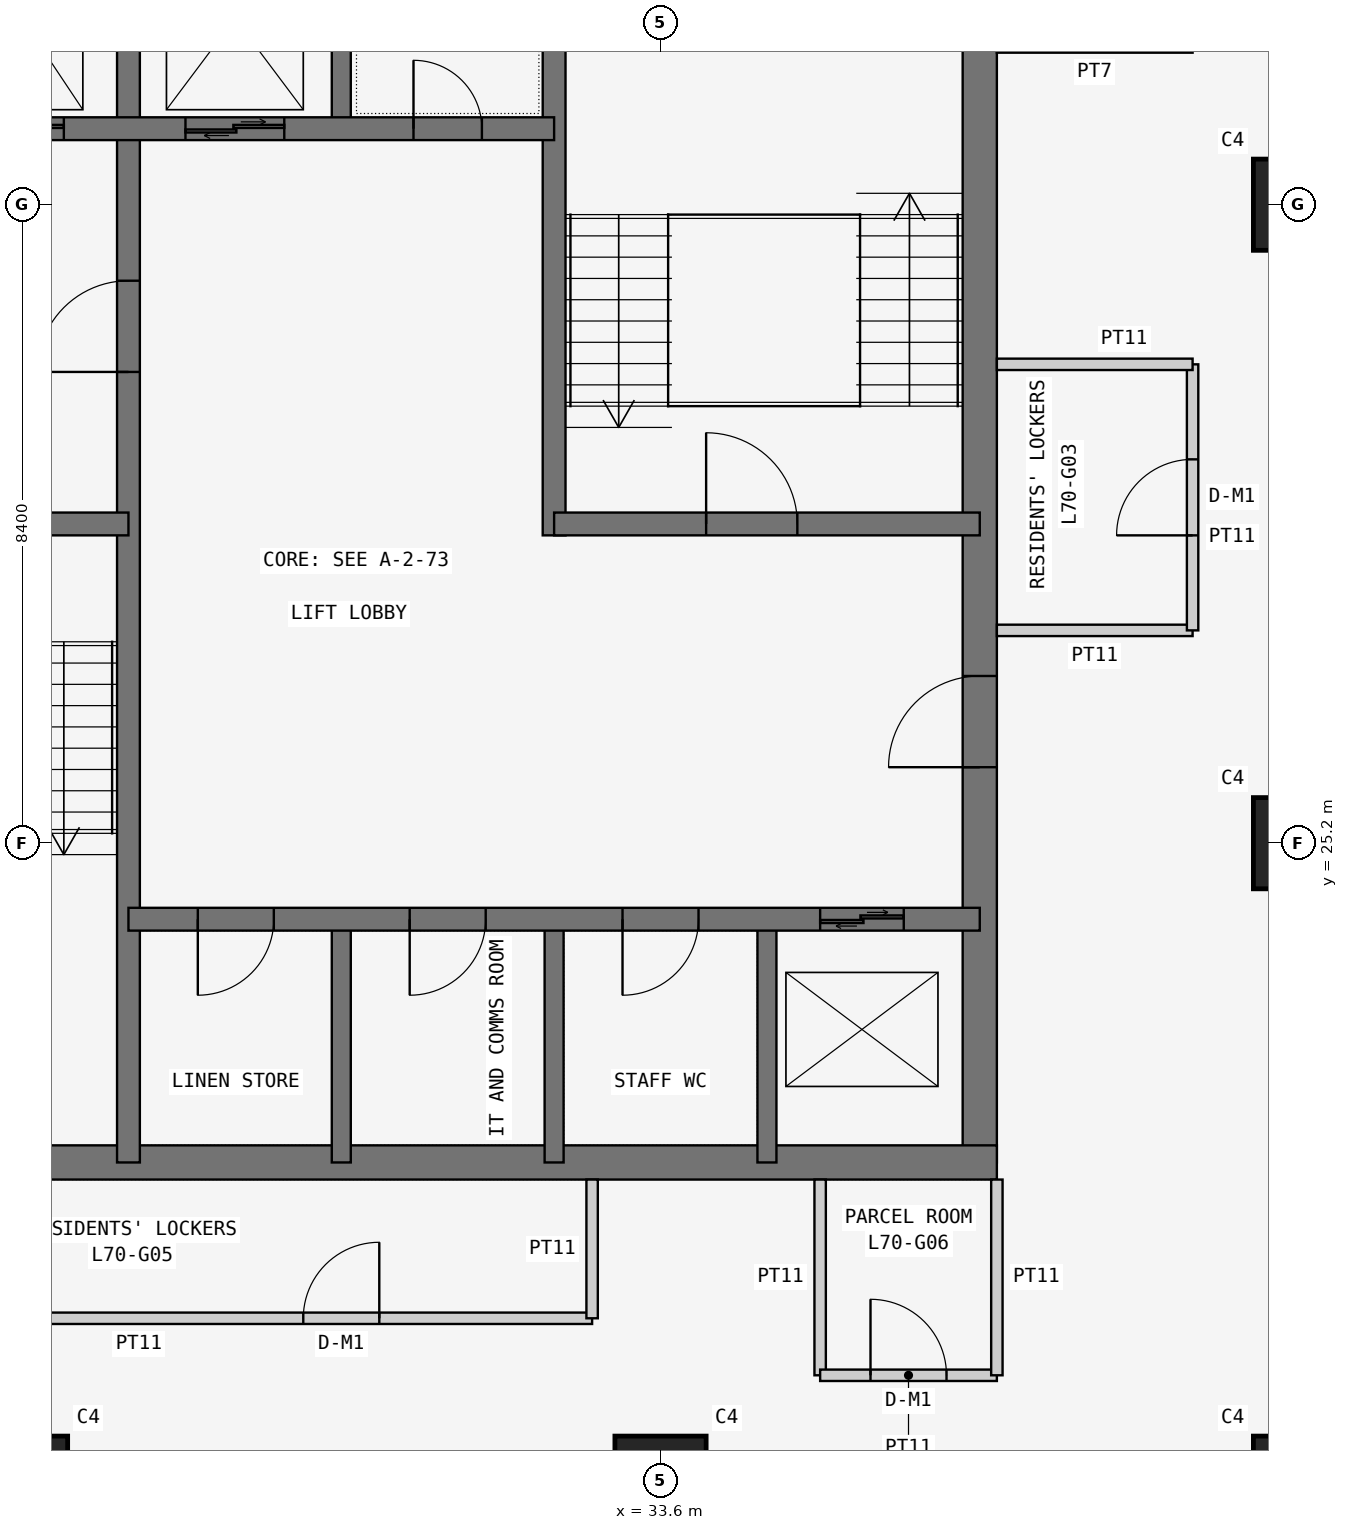
"""IFC4 building model, lengths in metres.
Left out: names, types, materials, properties, quantities, classifications, styles, units other than length and angle.
Written with IfcOpenShell. Run it as: python <this file> out.ifc"""

import sys

from ifc_helpers import new_model, si_unit, direction, frame, frame_2d, origin, origin_2d, place, context, subcontext, project, spatial, rectangle, extrude, element, fill, save


model = new_model("IFC4")
c1 = context("Model", 3, precision=1e-05, world=origin(), true_north=direction((0.0, 1.0)))
c2 = subcontext(c1, "Body", "Model", "MODEL_VIEW")
j1 = project(units=[si_unit("LENGTHUNIT", "METRE"), si_unit("PLANEANGLEUNIT", "RADIAN")], contexts=[c1])
p1 = place(None, origin())
s1 = spatial("IfcSite", under=j1, at=p1, CompositionType="ELEMENT")
p2 = place(p1, origin())
s2 = spatial("IfcBuilding", under=s1, at=p2, CompositionType="ELEMENT")
p3 = place(p2, frame((0.0, 0.0, 268.5)))
s3 = spatial("IfcBuildingStorey", under=s2, at=p3, CompositionType="ELEMENT", Elevation=268.5)
for number, where, z_axis, x_axis in (
    (1, (25.2, 16.8, 0.0), (0.0, 0.0, 1.0), (1.0, 0.0, 0.0)),
    (2, (33.6, 16.8, 0.0), (0.0, 0.0, 1.0), (1.0, 0.0, 0.0)),
    (3, (42.0, 16.8, 0.0), (0.0, 0.0, 1.0), (1.0, 0.0, 0.0)),
    (4, (42.0, 25.2, 0.0), (0.0, 0.0, 1.0), (1.0, 0.0, 0.0)),
    (5, (42.0, 33.6, 0.0), (0.0, 0.0, 1.0), (1.0, 0.0, 0.0)),
):
    element("IfcColumn", number, at=place(p3, frame(where, z_axis=z_axis, x_axis=x_axis)), inside=s3, PredefinedType="COLUMN", context=c2, shape_type="SweptSolid", body=[
        extrude(rectangle(XDim=1.2, YDim=1.2, at=origin_2d()), origin(), (0.0, 0.0, 1.0), 3.6),
    ])
p4 = place(p3, frame((21.0, 21.0, 0.0), z_axis=(0.0, 0.0, 1.0), x_axis=(1.0, 0.0, 0.0)))
e6 = element("IfcWall", 6, at=p4, inside=s3, PredefinedType="SHEAR", context=c2, shape_type="SweptSolid", body=[
    extrude(rectangle(XDim=17.025, YDim=0.45, at=frame_2d((8.512, 0.0))), origin(), (0.0, 0.0, 1.0), 3.6),
])
p5 = place(p3, frame((37.8, 21.0, 0.0), z_axis=(0.0, 0.0, 1.0), x_axis=(0.0, 1.0, 0.0)))
e7 = element("IfcWall", 7, at=p5, inside=s3, PredefinedType="SHEAR", context=c2, shape_type="SweptSolid", body=[
    extrude(rectangle(XDim=17.025, YDim=0.45, at=frame_2d((8.512, 0.0))), origin(), (0.0, 0.0, 1.0), 3.6),
])
p6 = place(p5, frame((5.2, 0.0, 0.0)))
e8 = element("IfcOpeningElement", 8, at=p6, cuts=e7, PredefinedType="OPENING", context=c2, shape_type="SweptSolid", body=[
    extrude(rectangle(XDim=1.2, YDim=2.1, at=frame_2d((0.6, 1.05))), frame((0.0, 0.235, 0.0), z_axis=(0.0, -1.0, 0.0), x_axis=(1.0, 0.0, 0.0)), (0.0, 0.0, 1.0), 0.47),
])
p7 = place(p3, frame((26.6, 21.0, 0.0), z_axis=(0.0, 0.0, 1.0), x_axis=(0.0, 1.0, 0.0)))
e9 = element("IfcWall", 9, at=p7, inside=s3, PredefinedType="SHEAR", context=c2, shape_type="SweptSolid", body=[
    extrude(rectangle(XDim=16.8, YDim=0.3, at=frame_2d((8.4, 0.0))), origin(), (0.0, 0.0, 1.0), 3.6),
])
p8 = place(p7, frame((10.4, 0.0, 0.0)))
e10 = element("IfcOpeningElement", 10, at=p8, cuts=e9, PredefinedType="OPENING", context=c2, shape_type="SweptSolid", body=[
    extrude(rectangle(XDim=1.2, YDim=2.1, at=frame_2d((0.6, 1.05))), frame((0.0, 0.16, 0.0), z_axis=(0.0, -1.0, 0.0), x_axis=(1.0, 0.0, 0.0)), (0.0, 0.0, 1.0), 0.32),
])
p9 = place(p3, frame((21.0, 29.4, 0.0), z_axis=(0.0, 0.0, 1.0), x_axis=(1.0, 0.0, 0.0)))
e11 = element("IfcWall", 11, at=p9, inside=s3, PredefinedType="SHEAR", context=c2, shape_type="SweptSolid", body=[
    extrude(rectangle(XDim=5.6, YDim=0.3, at=frame_2d((2.8, 0.0))), origin(), (0.0, 0.0, 1.0), 3.6),
])
p10 = place(p9, frame((2.3, 0.0, 0.0)))
e12 = element("IfcOpeningElement", 12, at=p10, cuts=e11, PredefinedType="OPENING", context=c2, shape_type="SweptSolid", body=[
    extrude(rectangle(XDim=1.2, YDim=2.1, at=frame_2d((0.6, 1.05))), frame((0.0, 0.16, 0.0), z_axis=(0.0, -1.0, 0.0), x_axis=(1.0, 0.0, 0.0)), (0.0, 0.0, 1.0), 0.32),
])
p11 = place(p3, frame((21.0, 34.6, 0.0), z_axis=(0.0, 0.0, 1.0), x_axis=(1.0, 0.0, 0.0)))
e13 = element("IfcWall", 13, at=p11, inside=s3, PredefinedType="SHEAR", context=c2, shape_type="SweptSolid", body=[
    extrude(rectangle(XDim=11.2, YDim=0.3, at=frame_2d((5.6, 0.0))), origin(), (0.0, 0.0, 1.0), 3.6),
])
p12 = place(p11, frame((9.35, 0.0, 0.0)))
e14 = element("IfcOpeningElement", 14, at=p12, cuts=e13, PredefinedType="OPENING", context=c2, shape_type="SweptSolid", body=[
    extrude(rectangle(XDim=0.9, YDim=2.1, at=frame_2d((0.45, 1.05))), frame((0.0, 0.16, 0.0), z_axis=(0.0, -1.0, 0.0), x_axis=(1.0, 0.0, 0.0)), (0.0, 0.0, 1.0), 0.32),
])
p13 = place(p11, frame((1.0, 0.0, 0.0)))
e15 = element("IfcOpeningElement", 15, at=p13, cuts=e13, PredefinedType="OPENING", context=c2, shape_type="SweptSolid", body=[
    extrude(rectangle(XDim=1.1, YDim=2.1, at=frame_2d((0.55, 1.05))), frame((0.0, 0.16, 0.0), z_axis=(0.0, -1.0, 0.0), x_axis=(1.0, 0.0, 0.0)), (0.0, 0.0, 1.0), 0.32),
])
p14 = place(p11, frame((3.65, 0.0, 0.0)))
e16 = element("IfcOpeningElement", 16, at=p14, cuts=e13, PredefinedType="OPENING", context=c2, shape_type="SweptSolid", body=[
    extrude(rectangle(XDim=1.1, YDim=2.1, at=frame_2d((0.55, 1.05))), frame((0.0, 0.16, 0.0), z_axis=(0.0, -1.0, 0.0), x_axis=(1.0, 0.0, 0.0)), (0.0, 0.0, 1.0), 0.32),
])
p15 = place(p11, frame((6.35, 0.0, 0.0)))
e17 = element("IfcOpeningElement", 17, at=p15, cuts=e13, PredefinedType="OPENING", context=c2, shape_type="SweptSolid", body=[
    extrude(rectangle(XDim=1.3, YDim=2.1, at=frame_2d((0.65, 1.05))), frame((0.0, 0.16, 0.0), z_axis=(0.0, -1.0, 0.0), x_axis=(1.0, 0.0, 0.0)), (0.0, 0.0, 1.0), 0.32),
])
p16 = place(p3, frame((26.6, 24.2, 0.0), z_axis=(0.0, 0.0, 1.0), x_axis=(1.0, 0.0, 0.0)))
e18 = element("IfcWall", 18, at=p16, inside=s3, PredefinedType="SHEAR", context=c2, shape_type="SweptSolid", body=[
    extrude(rectangle(XDim=11.2, YDim=0.3, at=frame_2d((5.6, 0.0))), origin(), (0.0, 0.0, 1.0), 3.6),
])
p17 = place(p16, frame((0.913, 0.0, 0.0)))
e19 = element("IfcOpeningElement", 19, at=p17, cuts=e18, PredefinedType="OPENING", context=c2, shape_type="SweptSolid", body=[
    extrude(rectangle(XDim=1.0, YDim=2.1, at=frame_2d((0.5, 1.05))), frame((0.0, 0.16, 0.0), z_axis=(0.0, -1.0, 0.0), x_axis=(1.0, 0.0, 0.0)), (0.0, 0.0, 1.0), 0.32),
])
p18 = place(p16, frame((3.7, 0.0, 0.0)))
e20 = element("IfcOpeningElement", 20, at=p18, cuts=e18, PredefinedType="OPENING", context=c2, shape_type="SweptSolid", body=[
    extrude(rectangle(XDim=1.0, YDim=2.1, at=frame_2d((0.5, 1.05))), frame((0.0, 0.16, 0.0), z_axis=(0.0, -1.0, 0.0), x_axis=(1.0, 0.0, 0.0)), (0.0, 0.0, 1.0), 0.32),
])
p19 = place(p16, frame((6.5, 0.0, 0.0)))
e21 = element("IfcOpeningElement", 21, at=p19, cuts=e18, PredefinedType="OPENING", context=c2, shape_type="SweptSolid", body=[
    extrude(rectangle(XDim=1.0, YDim=2.1, at=frame_2d((0.5, 1.05))), frame((0.0, 0.16, 0.0), z_axis=(0.0, -1.0, 0.0), x_axis=(1.0, 0.0, 0.0)), (0.0, 0.0, 1.0), 0.32),
])
p20 = place(p16, frame((9.1, 0.0, 0.0)))
e22 = element("IfcOpeningElement", 22, at=p20, cuts=e18, PredefinedType="OPENING", context=c2, shape_type="SweptSolid", body=[
    extrude(rectangle(XDim=1.1, YDim=2.1, at=frame_2d((0.55, 1.05))), frame((0.0, 0.16, 0.0), z_axis=(0.0, -1.0, 0.0), x_axis=(1.0, 0.0, 0.0)), (0.0, 0.0, 1.0), 0.32),
])
p21 = place(p3, frame((32.2, 29.25, 0.0), z_axis=(0.0, 0.0, 1.0), x_axis=(0.0, 1.0, 0.0)))
e23 = element("IfcWall", 23, at=p21, inside=s3, PredefinedType="SHEAR", context=c2, shape_type="SweptSolid", body=[
    extrude(rectangle(XDim=8.55, YDim=0.3, at=frame_2d((4.275, 0.0))), origin(), (0.0, 0.0, 1.0), 3.6),
])
p22 = place(p3, frame((32.2, 29.4, 0.0), z_axis=(0.0, 0.0, 1.0), x_axis=(1.0, 0.0, 0.0)))
e24 = element("IfcWall", 24, at=p22, inside=s3, PredefinedType="SHEAR", context=c2, shape_type="SweptSolid", body=[
    extrude(rectangle(XDim=5.6, YDim=0.3, at=frame_2d((2.8, 0.0))), origin(), (0.0, 0.0, 1.0), 3.6),
])
p23 = place(p22, frame((2.0, 0.0, 0.0)))
e25 = element("IfcOpeningElement", 25, at=p23, cuts=e24, PredefinedType="OPENING", context=c2, shape_type="SweptSolid", body=[
    extrude(rectangle(XDim=1.2, YDim=2.1, at=frame_2d((0.6, 1.05))), frame((0.0, 0.16, 0.0), z_axis=(0.0, -1.0, 0.0), x_axis=(1.0, 0.0, 0.0)), (0.0, 0.0, 1.0), 0.32),
])
for number, where, z_axis, x_axis in (
    (26, (29.4, 21.0, 0.0), (0.0, 0.0, 1.0), (0.0, 1.0, 0.0)),
    (27, (32.2, 21.0, 0.0), (0.0, 0.0, 1.0), (0.0, 1.0, 0.0)),
    (28, (35.0, 21.0, 0.0), (0.0, 0.0, 1.0), (0.0, 1.0, 0.0)),
    (29, (29.4, 34.6, 0.0), (0.0, 0.0, 1.0), (0.0, 1.0, 0.0)),
):
    element("IfcWall", number, at=place(p3, frame(where, z_axis=z_axis, x_axis=x_axis)), inside=s3, PredefinedType="SHEAR", context=c2, shape_type="SweptSolid", body=[
        extrude(rectangle(XDim=3.2, YDim=0.25, at=frame_2d((1.6, 0.0))), origin(), (0.0, 0.0, 1.0), 3.6),
    ])
p24 = place(p3, frame((38.025, 28.0, 0.0), z_axis=(0.0, 0.0, 1.0), x_axis=(1.0, 0.0, 0.0)))
e30 = element("IfcWall", 30, at=p24, inside=s3, PredefinedType="PARTITIONING", context=c2, shape_type="SweptSolid", body=[
    extrude(rectangle(XDim=2.575, YDim=0.15, at=frame_2d((1.288, 0.0))), origin(), (0.0, 0.0, 1.0), 3.45),
])
p25 = place(p3, frame((40.6, 28.0, 0.0), z_axis=(0.0, 0.0, 1.0), x_axis=(0.0, 1.0, 0.0)))
e31 = element("IfcWall", 31, at=p25, inside=s3, PredefinedType="PARTITIONING", context=c2, shape_type="SweptSolid", body=[
    extrude(rectangle(XDim=3.5, YDim=0.15, at=frame_2d((1.75, 0.0))), origin(), (0.0, 0.0, 1.0), 3.45),
])
p26 = place(p25, frame((1.25, 0.0, 0.0)))
e32 = element("IfcOpeningElement", 32, at=p26, cuts=e31, PredefinedType="OPENING", context=c2, shape_type="SweptSolid", body=[
    extrude(rectangle(XDim=1.0, YDim=2.1, at=frame_2d((0.5, 1.05))), frame((0.0, 0.085, 0.0), z_axis=(0.0, -1.0, 0.0), x_axis=(1.0, 0.0, 0.0)), (0.0, 0.0, 1.0), 0.17),
])
p27 = place(p3, frame((40.6, 31.5, 0.0), z_axis=(0.0, 0.0, 1.0), x_axis=(-1.0, 0.0, 0.0)))
e33 = element("IfcWall", 33, at=p27, inside=s3, PredefinedType="PARTITIONING", context=c2, shape_type="SweptSolid", body=[
    extrude(rectangle(XDim=2.575, YDim=0.15, at=frame_2d((1.288, 0.0))), origin(), (0.0, 0.0, 1.0), 3.45),
])
p28 = place(p3, frame((38.025, 35.7, 0.0), z_axis=(0.0, 0.0, 1.0), x_axis=(1.0, 0.0, 0.0)))
e34 = element("IfcWall", 34, at=p28, inside=s3, PredefinedType="PARTITIONING", context=c2, shape_type="SweptSolid", body=[
    extrude(rectangle(XDim=2.575, YDim=0.2, at=frame_2d((1.288, 0.0))), origin(), (0.0, 0.0, 1.0), 3.45),
])
p29 = place(p3, frame((20.775, 18.95, 0.0), z_axis=(0.0, 0.0, 1.0), x_axis=(1.0, 0.0, 0.0)))
e35 = element("IfcWall", 35, at=p29, inside=s3, PredefinedType="PARTITIONING", context=c2, shape_type="SweptSolid", body=[
    extrude(rectangle(XDim=11.925, YDim=0.15, at=frame_2d((5.962, 0.0))), origin(), (0.0, 0.0, 1.0), 3.45),
])
p30 = place(p29, frame((8.125, 0.0, 0.0)))
e36 = element("IfcOpeningElement", 36, at=p30, cuts=e35, PredefinedType="OPENING", context=c2, shape_type="SweptSolid", body=[
    extrude(rectangle(XDim=1.0, YDim=2.1, at=frame_2d((0.5, 1.05))), frame((0.0, 0.085, 0.0), z_axis=(0.0, -1.0, 0.0), x_axis=(1.0, 0.0, 0.0)), (0.0, 0.0, 1.0), 0.17),
])
p31 = place(p3, frame((32.7, 18.95, 0.0), z_axis=(0.0, 0.0, 1.0), x_axis=(0.0, 1.0, 0.0)))
e37 = element("IfcWall", 37, at=p31, inside=s3, PredefinedType="PARTITIONING", context=c2, shape_type="SweptSolid", body=[
    extrude(rectangle(XDim=1.825, YDim=0.15, at=frame_2d((0.913, 0.0))), origin(), (0.0, 0.0, 1.0), 3.45),
])
p32 = place(p3, frame((35.7, 20.775, 0.0), z_axis=(0.0, 0.0, 1.0), x_axis=(0.0, -1.0, 0.0)))
e38 = element("IfcWall", 38, at=p32, inside=s3, PredefinedType="PARTITIONING", context=c2, shape_type="SweptSolid", body=[
    extrude(rectangle(XDim=2.575, YDim=0.15, at=frame_2d((1.288, 0.0))), origin(), (0.0, 0.0, 1.0), 3.45),
])
p33 = place(p3, frame((35.7, 18.2, 0.0), z_axis=(0.0, 0.0, 1.0), x_axis=(1.0, 0.0, 0.0)))
e39 = element("IfcWall", 39, at=p33, inside=s3, PredefinedType="PARTITIONING", context=c2, shape_type="SweptSolid", body=[
    extrude(rectangle(XDim=2.325, YDim=0.15, at=frame_2d((1.163, 0.0))), origin(), (0.0, 0.0, 1.0), 3.45),
])
p34 = place(p33, frame((0.663, 0.0, 0.0)))
e40 = element("IfcOpeningElement", 40, at=p34, cuts=e39, PredefinedType="OPENING", context=c2, shape_type="SweptSolid", body=[
    extrude(rectangle(XDim=1.0, YDim=2.1, at=frame_2d((0.5, 1.05))), frame((0.0, 0.085, 0.0), z_axis=(0.0, -1.0, 0.0), x_axis=(1.0, 0.0, 0.0)), (0.0, 0.0, 1.0), 0.17),
])
p35 = place(p3, frame((38.025, 18.2, 0.0), z_axis=(0.0, 0.0, 1.0), x_axis=(0.0, 1.0, 0.0)))
e41 = element("IfcWall", 41, at=p35, inside=s3, PredefinedType="PARTITIONING", context=c2, shape_type="SweptSolid", body=[
    extrude(rectangle(XDim=2.575, YDim=0.15, at=frame_2d((1.288, 0.0))), origin(), (0.0, 0.0, 1.0), 3.45),
])
p36 = place(p26, origin())
e42 = element("IfcDoor", 42, at=p36, inside=s3, OperationType="SINGLE_SWING_LEFT", PredefinedType="DOOR", context=c2, shape_type="SweptSolid", body=[
    extrude(rectangle(XDim=1.0, YDim=2.1, at=frame_2d((0.5, 1.05))), frame((0.0, 0.025, 0.0), z_axis=(0.0, -1.0, 0.0), x_axis=(1.0, 0.0, 0.0)), (0.0, 0.0, 1.0), 0.05),
])
fill(e32, e42)
p37 = place(p30, origin())
e43 = element("IfcDoor", 43, at=p37, inside=s3, OperationType="SINGLE_SWING_RIGHT", PredefinedType="DOOR", context=c2, shape_type="SweptSolid", body=[
    extrude(rectangle(XDim=1.0, YDim=2.1, at=frame_2d((0.5, 1.05))), frame((0.0, 0.025, 0.0), z_axis=(0.0, -1.0, 0.0), x_axis=(1.0, 0.0, 0.0)), (0.0, 0.0, 1.0), 0.05),
])
fill(e36, e43)
p38 = place(p34, origin())
e44 = element("IfcDoor", 44, at=p38, inside=s3, OperationType="SINGLE_SWING_LEFT", PredefinedType="DOOR", context=c2, shape_type="SweptSolid", body=[
    extrude(rectangle(XDim=1.0, YDim=2.1, at=frame_2d((0.5, 1.05))), frame((0.0, 0.025, 0.0), z_axis=(0.0, -1.0, 0.0), x_axis=(1.0, 0.0, 0.0)), (0.0, 0.0, 1.0), 0.05),
])
fill(e40, e44)
p39 = place(p8, origin())
e45 = element("IfcDoor", 45, at=p39, inside=s3, OperationType="SINGLE_SWING_LEFT", PredefinedType="DOOR", context=c2, shape_type="SweptSolid", body=[
    extrude(rectangle(XDim=1.2, YDim=2.1, at=frame_2d((0.6, 1.05))), frame((0.0, 0.025, 0.0), z_axis=(0.0, -1.0, 0.0), x_axis=(1.0, 0.0, 0.0)), (0.0, 0.0, 1.0), 0.05),
])
fill(e10, e45)
p40 = place(p6, origin())
e46 = element("IfcDoor", 46, at=p40, inside=s3, OperationType="SINGLE_SWING_LEFT", PredefinedType="DOOR", context=c2, shape_type="SweptSolid", body=[
    extrude(rectangle(XDim=1.2, YDim=2.1, at=frame_2d((0.6, 1.05))), frame((0.0, 0.025, 0.0), z_axis=(0.0, -1.0, 0.0), x_axis=(1.0, 0.0, 0.0)), (0.0, 0.0, 1.0), 0.05),
])
fill(e8, e46)
p41 = place(p23, origin())
e47 = element("IfcDoor", 47, at=p41, inside=s3, OperationType="SINGLE_SWING_LEFT", PredefinedType="DOOR", context=c2, shape_type="SweptSolid", body=[
    extrude(rectangle(XDim=1.2, YDim=2.1, at=frame_2d((0.6, 1.05))), frame((0.0, 0.025, 0.0), z_axis=(0.0, -1.0, 0.0), x_axis=(1.0, 0.0, 0.0)), (0.0, 0.0, 1.0), 0.05),
])
fill(e25, e47)
p42 = place(p12, origin())
e48 = element("IfcDoor", 48, at=p42, inside=s3, OperationType="SINGLE_SWING_LEFT", PredefinedType="DOOR", context=c2, shape_type="SweptSolid", body=[
    extrude(rectangle(XDim=0.9, YDim=2.1, at=frame_2d((0.45, 1.05))), frame((0.0, 0.025, 0.0), z_axis=(0.0, -1.0, 0.0), x_axis=(1.0, 0.0, 0.0)), (0.0, 0.0, 1.0), 0.05),
])
fill(e14, e48)
p43 = place(p17, frame((1.0, 0.0, 0.0), z_axis=(0.0, 0.0, 1.0), x_axis=(-1.0, 0.0, 0.0)))
e49 = element("IfcDoor", 49, at=p43, inside=s3, OperationType="SINGLE_SWING_RIGHT", PredefinedType="DOOR", context=c2, shape_type="SweptSolid", body=[
    extrude(rectangle(XDim=1.0, YDim=2.1, at=frame_2d((0.5, 1.05))), frame((0.0, 0.025, 0.0), z_axis=(0.0, -1.0, 0.0), x_axis=(1.0, 0.0, 0.0)), (0.0, 0.0, 1.0), 0.05),
])
fill(e19, e49)
p44 = place(p18, frame((1.0, 0.0, 0.0), z_axis=(0.0, 0.0, 1.0), x_axis=(-1.0, 0.0, 0.0)))
e50 = element("IfcDoor", 50, at=p44, inside=s3, OperationType="SINGLE_SWING_RIGHT", PredefinedType="DOOR", context=c2, shape_type="SweptSolid", body=[
    extrude(rectangle(XDim=1.0, YDim=2.1, at=frame_2d((0.5, 1.05))), frame((0.0, 0.025, 0.0), z_axis=(0.0, -1.0, 0.0), x_axis=(1.0, 0.0, 0.0)), (0.0, 0.0, 1.0), 0.05),
])
fill(e20, e50)
p45 = place(p19, frame((1.0, 0.0, 0.0), z_axis=(0.0, 0.0, 1.0), x_axis=(-1.0, 0.0, 0.0)))
e51 = element("IfcDoor", 51, at=p45, inside=s3, OperationType="SINGLE_SWING_RIGHT", PredefinedType="DOOR", context=c2, shape_type="SweptSolid", body=[
    extrude(rectangle(XDim=1.0, YDim=2.1, at=frame_2d((0.5, 1.05))), frame((0.0, 0.025, 0.0), z_axis=(0.0, -1.0, 0.0), x_axis=(1.0, 0.0, 0.0)), (0.0, 0.0, 1.0), 0.05),
])
fill(e21, e51)
p46 = place(p20, origin())
e52 = element("IfcDoor", 52, at=p46, inside=s3, OperationType="DOUBLE_DOOR_SLIDING", PredefinedType="DOOR", context=c2, shape_type="SweptSolid", body=[
    extrude(rectangle(XDim=1.1, YDim=2.1, at=frame_2d((0.55, 1.05))), frame((0.0, 0.025, 0.0), z_axis=(0.0, -1.0, 0.0), x_axis=(1.0, 0.0, 0.0)), (0.0, 0.0, 1.0), 0.05),
])
fill(e22, e52)
p47 = place(p14, origin())
e53 = element("IfcDoor", 53, at=p47, inside=s3, OperationType="DOUBLE_DOOR_SLIDING", PredefinedType="DOOR", context=c2, shape_type="SweptSolid", body=[
    extrude(rectangle(XDim=1.1, YDim=2.1, at=frame_2d((0.55, 1.05))), frame((0.0, 0.025, 0.0), z_axis=(0.0, -1.0, 0.0), x_axis=(1.0, 0.0, 0.0)), (0.0, 0.0, 1.0), 0.05),
])
fill(e16, e53)
p48 = place(p15, origin())
e54 = element("IfcDoor", 54, at=p48, inside=s3, OperationType="DOUBLE_DOOR_SLIDING", PredefinedType="DOOR", context=c2, shape_type="SweptSolid", body=[
    extrude(rectangle(XDim=1.3, YDim=2.1, at=frame_2d((0.65, 1.05))), frame((0.0, 0.025, 0.0), z_axis=(0.0, -1.0, 0.0), x_axis=(1.0, 0.0, 0.0)), (0.0, 0.0, 1.0), 0.05),
])
fill(e17, e54)
save(model, sys.argv[1])
